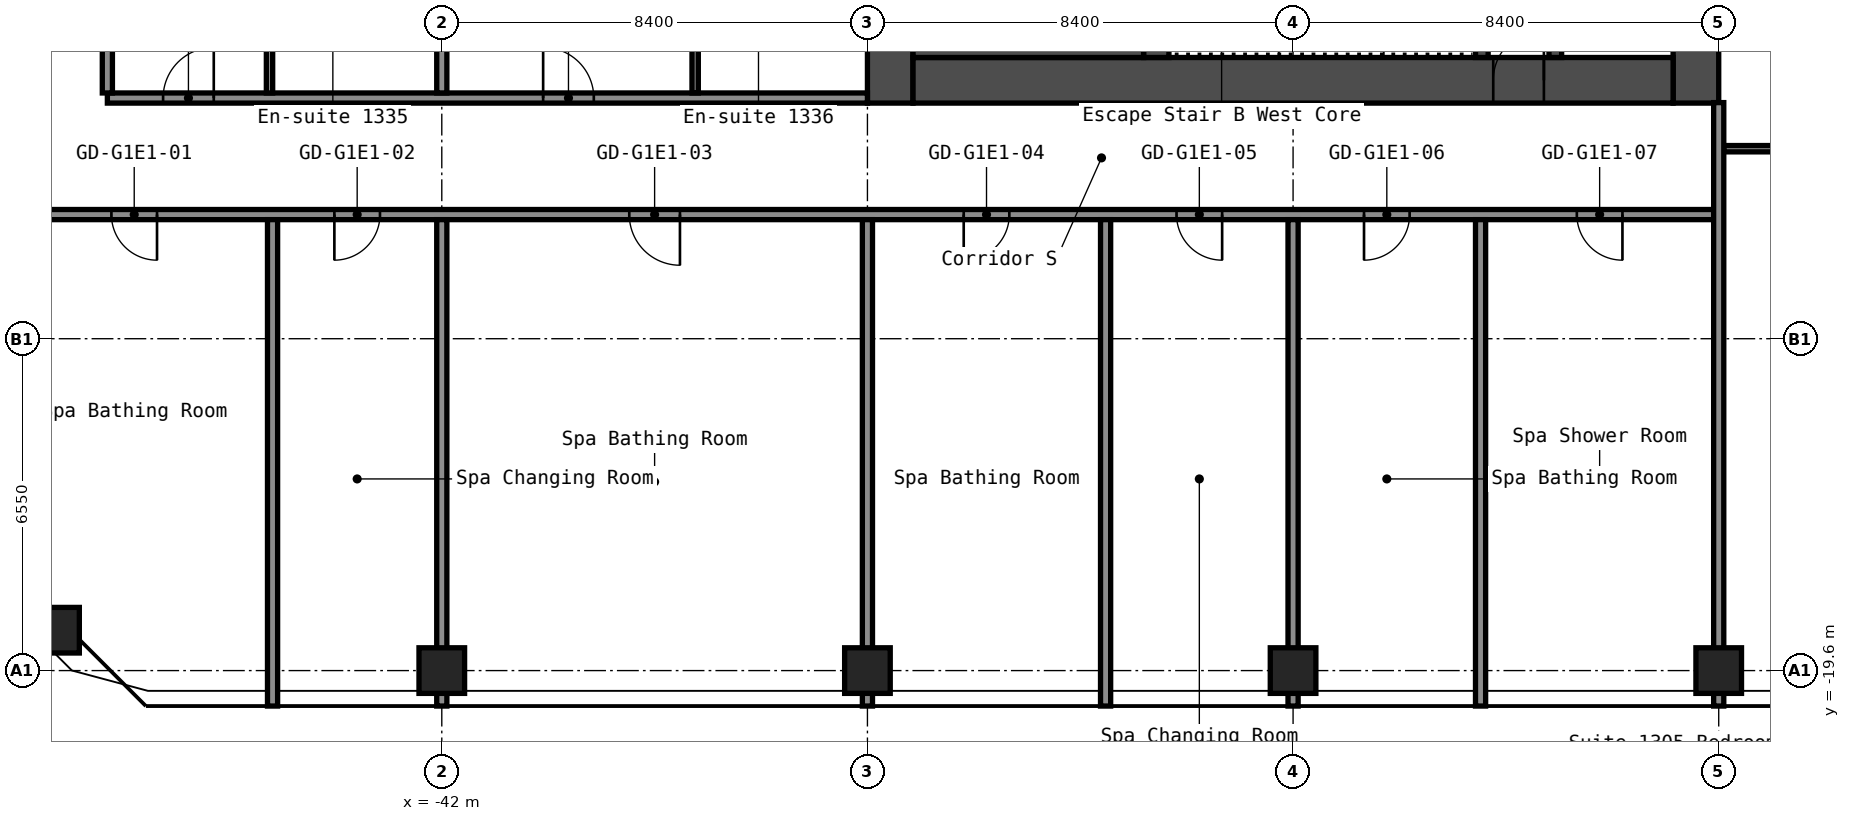
"""IFC4 building model, lengths in metres.
Left out: names, types, materials, properties, quantities, classifications, styles, units other than length and angle.
Written with IfcOpenShell. Run it as: python <this file> out.ifc"""

import sys

from ifc_helpers import new_model, si_unit, direction, frame, frame_2d, origin, origin_2d, place, context, subcontext, project, spatial, rectangle, hollow_rectangle, extrude, element, fill, save


model = new_model("IFC4")
c1 = context("Model", 3, precision=1e-05, world=origin(), true_north=direction((0.0, 1.0)))
c2 = subcontext(c1, "Body", "Model", "MODEL_VIEW")
j1 = project(units=[si_unit("LENGTHUNIT", "METRE"), si_unit("PLANEANGLEUNIT", "RADIAN")], contexts=[c1])
p1 = place(None, origin())
s1 = spatial("IfcSite", under=j1, at=p1, CompositionType="ELEMENT")
p2 = place(p1, origin())
s2 = spatial("IfcBuilding", under=s1, at=p2, CompositionType="ELEMENT")
p3 = place(p2, frame((0.0, 0.0, 48.6)))
s3 = spatial("IfcBuildingStorey", under=s2, at=p3, CompositionType="ELEMENT", Elevation=48.6)
for number, where, z_axis, x_axis in (
    (1, (-49.603, -18.803, 0.0), (0.0, 0.0, 1.0), (1.0, 0.0, 0.0)),
    (2, (-42.0, -19.6, 0.0), (0.0, 0.0, 1.0), (1.0, 0.0, 0.0)),
    (3, (-33.6, -19.6, 0.0), (0.0, 0.0, 1.0), (1.0, 0.0, 0.0)),
    (4, (-25.2, -19.6, 0.0), (0.0, 0.0, 1.0), (1.0, 0.0, 0.0)),
    (5, (-16.8, -19.6, 0.0), (0.0, 0.0, 1.0), (1.0, 0.0, 0.0)),
):
    element("IfcColumn", number, at=place(p3, frame(where, z_axis=z_axis, x_axis=x_axis)), inside=s3, PredefinedType="COLUMN", context=c2, shape_type="SweptSolid", body=[
        extrude(hollow_rectangle(XDim=0.9, YDim=0.9, WallThickness=0.036, at=origin_2d()), origin(), (0.0, 0.0, 1.0), 2.8),
    ])
p4 = place(p3, frame((-17.25, -8.4, 0.0), z_axis=(0.0, 0.0, 1.0), x_axis=(0.0, 1.0, 0.0)))
e6 = element("IfcWall", 6, at=p4, inside=s3, PredefinedType="SHEAR", context=c2, shape_type="SweptSolid", body=[
    extrude(rectangle(XDim=16.8, YDim=0.9, at=frame_2d((8.4, 0.0))), origin(), (0.0, 0.0, 1.0), 2.8),
])
p5 = place(p4, frame((12.75, 0.0, 0.0)))
e7 = element("IfcOpeningElement", 7, at=p5, cuts=e6, PredefinedType="OPENING", context=c2, shape_type="SweptSolid", body=[
    extrude(rectangle(XDim=1.2, YDim=2.1, at=frame_2d((0.6, 1.05))), frame((0.0, 0.46, 0.0), z_axis=(0.0, -1.0, 0.0), x_axis=(1.0, 0.0, 0.0)), (0.0, 0.0, 1.0), 0.92),
])
p6 = place(p4, frame((2.85, 0.0, 0.0)))
e8 = element("IfcOpeningElement", 8, at=p6, cuts=e6, PredefinedType="OPENING", context=c2, shape_type="SweptSolid", body=[
    extrude(rectangle(XDim=1.2, YDim=2.1, at=frame_2d((0.6, 1.05))), frame((0.0, 0.46, 0.0), z_axis=(0.0, -1.0, 0.0), x_axis=(1.0, 0.0, 0.0)), (0.0, 0.0, 1.0), 0.92),
])
p7 = place(p3, frame((-33.15, -8.4, 0.0), z_axis=(0.0, 0.0, 1.0), x_axis=(0.0, 1.0, 0.0)))
e9 = element("IfcWall", 9, at=p7, inside=s3, PredefinedType="SHEAR", context=c2, shape_type="SweptSolid", body=[
    extrude(rectangle(XDim=16.8, YDim=0.9, at=frame_2d((8.4, 0.0))), origin(), (0.0, 0.0, 1.0), 2.8),
])
p8 = place(p3, frame((-32.7, -7.95, 0.0), z_axis=(0.0, 0.0, 1.0), x_axis=(1.0, 0.0, 0.0)))
e10 = element("IfcWall", 10, at=p8, inside=s3, PredefinedType="SHEAR", context=c2, shape_type="SweptSolid", body=[
    extrude(rectangle(XDim=15.0, YDim=0.9, at=frame_2d((7.5, 0.0))), origin(), (0.0, 0.0, 1.0), 2.8),
])
p9 = place(p8, frame((11.45, 0.0, 0.0)))
e11 = element("IfcOpeningElement", 11, at=p9, cuts=e10, PredefinedType="OPENING", context=c2, shape_type="SweptSolid", body=[
    extrude(rectangle(XDim=1.0, YDim=2.1, at=frame_2d((0.5, 1.05))), frame((0.0, 0.46, 0.0), z_axis=(0.0, -1.0, 0.0), x_axis=(1.0, 0.0, 0.0)), (0.0, 0.0, 1.0), 0.92),
])
p10 = place(p3, frame((-20.025, -7.5, 0.0), z_axis=(0.0, 0.0, 1.0), x_axis=(0.0, 1.0, 0.0)))
e12 = element("IfcWall", 12, at=p10, inside=s3, PredefinedType="SHEAR", context=c2, shape_type="SweptSolid", body=[
    extrude(rectangle(XDim=6.3, YDim=0.25, at=frame_2d((3.15, 0.0))), origin(), (0.0, 0.0, 1.0), 2.8),
])
p11 = place(p10, frame((2.4, 0.0, 0.0)))
e13 = element("IfcOpeningElement", 13, at=p11, cuts=e12, PredefinedType="OPENING", context=c2, shape_type="SweptSolid", body=[
    extrude(rectangle(XDim=1.0, YDim=2.1, at=frame_2d((0.5, 1.05))), frame((0.0, 0.135, 0.0), z_axis=(0.0, -1.0, 0.0), x_axis=(1.0, 0.0, 0.0)), (0.0, 0.0, 1.0), 0.27),
])
p12 = place(p3, frame((-21.475, -7.5, 0.0), z_axis=(0.0, 0.0, 1.0), x_axis=(0.0, 1.0, 0.0)))
e14 = element("IfcWall", 14, at=p12, inside=s3, PredefinedType="SHEAR", context=c2, shape_type="SweptSolid", body=[
    extrude(rectangle(XDim=3.75, YDim=0.25, at=frame_2d((1.875, 0.0))), origin(), (0.0, 0.0, 1.0), 2.8),
])
p13 = place(p12, frame((1.3, 0.0, 0.0)))
e15 = element("IfcOpeningElement", 15, at=p13, cuts=e14, PredefinedType="OPENING", context=c2, shape_type="SweptSolid", body=[
    extrude(rectangle(XDim=1.2, YDim=2.1, at=frame_2d((0.6, 1.05))), frame((0.0, 0.135, 0.0), z_axis=(0.0, -1.0, 0.0), x_axis=(1.0, 0.0, 0.0)), (0.0, 0.0, 1.0), 0.27),
])
p14 = place(p3, frame((-27.9, -7.5, 0.0), z_axis=(0.0, 0.0, 1.0), x_axis=(0.0, 1.0, 0.0)))
e16 = element("IfcWall", 16, at=p14, inside=s3, PredefinedType="SHEAR", context=c2, shape_type="SweptSolid", body=[
    extrude(rectangle(XDim=3.75, YDim=0.5, at=frame_2d((1.875, 0.0))), origin(), (0.0, 0.0, 1.0), 2.8),
])
p15 = place(p3, frame((-32.7, -6.75, 0.0), z_axis=(0.0, 0.0, 1.0), x_axis=(1.0, 0.0, 0.0)))
e17 = element("IfcWall", 17, at=p15, inside=s3, PredefinedType="SHEAR", context=c2, shape_type="SweptSolid", body=[
    extrude(rectangle(XDim=4.55, YDim=1.5, at=frame_2d((2.275, 0.0))), origin(), (0.0, 0.0, 1.0), 2.8),
])
p16 = place(p3, frame((-51.1, -10.6, 0.0), z_axis=(0.0, 0.0, 1.0), x_axis=(1.0, 0.0, 0.0)))
e18 = element("IfcWall", 18, at=p16, inside=s3, PredefinedType="PARTITIONING", context=c2, shape_type="SweptSolid", body=[
    extrude(rectangle(XDim=34.3, YDim=0.2, at=frame_2d((17.15, 0.0))), origin(), (0.0, 0.0, 1.0), 2.8),
])
p17 = place(p16, frame((2.58, 0.0, 0.0)))
e19 = element("IfcOpeningElement", 19, at=p17, cuts=e18, PredefinedType="OPENING", context=c2, shape_type="SweptSolid", body=[
    extrude(rectangle(XDim=0.9, YDim=2.1, at=frame_2d((0.45, 1.05))), frame((0.0, 0.11, 0.0), z_axis=(0.0, -1.0, 0.0), x_axis=(1.0, 0.0, 0.0)), (0.0, 0.0, 1.0), 0.22),
])
p18 = place(p16, frame((6.98, 0.0, 0.0)))
e20 = element("IfcOpeningElement", 20, at=p18, cuts=e18, PredefinedType="OPENING", context=c2, shape_type="SweptSolid", body=[
    extrude(rectangle(XDim=0.9, YDim=2.1, at=frame_2d((0.45, 1.05))), frame((0.0, 0.11, 0.0), z_axis=(0.0, -1.0, 0.0), x_axis=(1.0, 0.0, 0.0)), (0.0, 0.0, 1.0), 0.22),
])
p19 = place(p16, frame((12.8, 0.0, 0.0)))
e21 = element("IfcOpeningElement", 21, at=p19, cuts=e18, PredefinedType="OPENING", context=c2, shape_type="SweptSolid", body=[
    extrude(rectangle(XDim=1.0, YDim=2.1, at=frame_2d((0.5, 1.05))), frame((0.0, 0.11, 0.0), z_axis=(0.0, -1.0, 0.0), x_axis=(1.0, 0.0, 0.0)), (0.0, 0.0, 1.0), 0.22),
])
p20 = place(p16, frame((19.4, 0.0, 0.0)))
e22 = element("IfcOpeningElement", 22, at=p20, cuts=e18, PredefinedType="OPENING", context=c2, shape_type="SweptSolid", body=[
    extrude(rectangle(XDim=0.9, YDim=2.1, at=frame_2d((0.45, 1.05))), frame((0.0, 0.11, 0.0), z_axis=(0.0, -1.0, 0.0), x_axis=(1.0, 0.0, 0.0)), (0.0, 0.0, 1.0), 0.22),
])
p21 = place(p16, frame((23.6, 0.0, 0.0)))
e23 = element("IfcOpeningElement", 23, at=p21, cuts=e18, PredefinedType="OPENING", context=c2, shape_type="SweptSolid", body=[
    extrude(rectangle(XDim=0.9, YDim=2.1, at=frame_2d((0.45, 1.05))), frame((0.0, 0.11, 0.0), z_axis=(0.0, -1.0, 0.0), x_axis=(1.0, 0.0, 0.0)), (0.0, 0.0, 1.0), 0.22),
])
p22 = place(p16, frame((27.3, 0.0, 0.0)))
e24 = element("IfcOpeningElement", 24, at=p22, cuts=e18, PredefinedType="OPENING", context=c2, shape_type="SweptSolid", body=[
    extrude(rectangle(XDim=0.9, YDim=2.1, at=frame_2d((0.45, 1.05))), frame((0.0, 0.11, 0.0), z_axis=(0.0, -1.0, 0.0), x_axis=(1.0, 0.0, 0.0)), (0.0, 0.0, 1.0), 0.22),
])
p23 = place(p16, frame((31.5, 0.0, 0.0)))
e25 = element("IfcOpeningElement", 25, at=p23, cuts=e18, PredefinedType="OPENING", context=c2, shape_type="SweptSolid", body=[
    extrude(rectangle(XDim=0.9, YDim=2.1, at=frame_2d((0.45, 1.05))), frame((0.0, 0.11, 0.0), z_axis=(0.0, -1.0, 0.0), x_axis=(1.0, 0.0, 0.0)), (0.0, 0.0, 1.0), 0.22),
])
p24 = place(p3, frame((-16.7, -9.3, 0.0), z_axis=(0.0, 0.0, 1.0), x_axis=(1.0, 0.0, 0.0)))
e26 = element("IfcWall", 26, at=p24, inside=s3, PredefinedType="PARTITIONING", context=c2, shape_type="SweptSolid", body=[
    extrude(rectangle(XDim=2.837, YDim=0.125, at=frame_2d((1.419, 0.0))), origin(), (0.0, 0.0, 1.0), 2.8),
])
p25 = place(p24, frame((1.0, 0.0, 0.0)))
e27 = element("IfcOpeningElement", 27, at=p25, cuts=e26, PredefinedType="OPENING", context=c2, shape_type="SweptSolid", body=[
    extrude(rectangle(XDim=0.8, YDim=2.1, at=frame_2d((0.4, 1.05))), frame((0.0, 0.073, 0.0), z_axis=(0.0, -1.0, 0.0), x_axis=(1.0, 0.0, 0.0)), (0.0, 0.0, 1.0), 0.145),
])
p26 = place(p3, frame((-48.6, -8.3, 0.0), z_axis=(0.0, 0.0, 1.0), x_axis=(1.0, 0.0, 0.0)))
e28 = element("IfcWall", 28, at=p26, inside=s3, PredefinedType="PARTITIONING", context=c2, shape_type="SweptSolid", body=[
    extrude(rectangle(XDim=15.0, YDim=0.2, at=frame_2d((7.5, 0.0))), origin(), (0.0, 0.0, 1.0), 2.8),
])
p27 = place(p26, frame((1.1, 0.0, 0.0)))
e29 = element("IfcOpeningElement", 29, at=p27, cuts=e28, PredefinedType="OPENING", context=c2, shape_type="SweptSolid", body=[
    extrude(rectangle(XDim=1.0, YDim=2.1, at=frame_2d((0.5, 1.05))), frame((0.0, 0.11, 0.0), z_axis=(0.0, -1.0, 0.0), x_axis=(1.0, 0.0, 0.0)), (0.0, 0.0, 1.0), 0.22),
])
p28 = place(p26, frame((8.6, 0.0, 0.0)))
e30 = element("IfcOpeningElement", 30, at=p28, cuts=e28, PredefinedType="OPENING", context=c2, shape_type="SweptSolid", body=[
    extrude(rectangle(XDim=1.0, YDim=2.1, at=frame_2d((0.5, 1.05))), frame((0.0, 0.11, 0.0), z_axis=(0.0, -1.0, 0.0), x_axis=(1.0, 0.0, 0.0)), (0.0, 0.0, 1.0), 0.22),
])
p29 = place(p3, frame((-48.6, -8.2, 0.0), z_axis=(0.0, 0.0, 1.0), x_axis=(0.0, 1.0, 0.0)))
e31 = element("IfcWall", 31, at=p29, inside=s3, PredefinedType="PARTITIONING", context=c2, shape_type="SweptSolid", body=[
    extrude(rectangle(XDim=16.4, YDim=0.2, at=frame_2d((8.2, 0.0))), origin(), (0.0, 0.0, 1.0), 2.8),
])
p30 = place(p3, frame((-45.4, -8.2, 0.0), z_axis=(0.0, 0.0, 1.0), x_axis=(0.0, 1.0, 0.0)))
e32 = element("IfcWall", 32, at=p30, inside=s3, PredefinedType="PARTITIONING", context=c2, shape_type="SweptSolid", body=[
    extrude(rectangle(XDim=3.3, YDim=0.125, at=frame_2d((1.65, 0.0))), origin(), (0.0, 0.0, 1.0), 2.8),
])
for number, where, z_axis, x_axis in (
    (33, (-45.34, -20.3, 0.0), (0.0, 0.0, 1.0), (0.0, 1.0, 0.0)),
    (34, (-42.0, -20.3, 0.0), (0.0, 0.0, 1.0), (0.0, 1.0, 0.0)),
):
    element("IfcWall", number, at=place(p3, frame(where, z_axis=z_axis, x_axis=x_axis)), inside=s3, PredefinedType="PARTITIONING", context=c2, shape_type="SweptSolid", body=[
        extrude(rectangle(XDim=9.6, YDim=0.2, at=frame_2d((4.8, 0.0))), origin(), (0.0, 0.0, 1.0), 2.8),
    ])
p31 = place(p3, frame((-42.0, -8.2, 0.0), z_axis=(0.0, 0.0, 1.0), x_axis=(0.0, 1.0, 0.0)))
e35 = element("IfcWall", 35, at=p31, inside=s3, PredefinedType="PARTITIONING", context=c2, shape_type="SweptSolid", body=[
    extrude(rectangle(XDim=16.4, YDim=0.2, at=frame_2d((8.2, 0.0))), origin(), (0.0, 0.0, 1.0), 2.8),
])
p32 = place(p3, frame((-37.0, -8.2, 0.0), z_axis=(0.0, 0.0, 1.0), x_axis=(0.0, 1.0, 0.0)))
e36 = element("IfcWall", 36, at=p32, inside=s3, PredefinedType="PARTITIONING", context=c2, shape_type="SweptSolid", body=[
    extrude(rectangle(XDim=3.3, YDim=0.125, at=frame_2d((1.65, 0.0))), origin(), (0.0, 0.0, 1.0), 2.8),
])
for number, where, z_axis, x_axis in (
    (37, (-33.6, -20.3, 0.0), (0.0, 0.0, 1.0), (0.0, 1.0, 0.0)),
    (38, (-28.9, -20.3, 0.0), (0.0, 0.0, 1.0), (0.0, 1.0, 0.0)),
    (39, (-25.2, -20.3, 0.0), (0.0, 0.0, 1.0), (0.0, 1.0, 0.0)),
    (40, (-21.5, -20.3, 0.0), (0.0, 0.0, 1.0), (0.0, 1.0, 0.0)),
):
    element("IfcWall", number, at=place(p3, frame(where, z_axis=z_axis, x_axis=x_axis)), inside=s3, PredefinedType="PARTITIONING", context=c2, shape_type="SweptSolid", body=[
        extrude(rectangle(XDim=9.6, YDim=0.2, at=frame_2d((4.8, 0.0))), origin(), (0.0, 0.0, 1.0), 2.8),
    ])
p33 = place(p3, frame((-16.8, -20.3, 0.0), z_axis=(0.0, 0.0, 1.0), x_axis=(0.0, 1.0, 0.0)))
e41 = element("IfcWall", 41, at=p33, inside=s3, PredefinedType="PARTITIONING", context=c2, shape_type="SweptSolid", body=[
    extrude(rectangle(XDim=11.91, YDim=0.2, at=frame_2d((5.955, 0.0))), origin(), (0.0, 0.0, 1.0), 2.8),
])
p34 = place(p9, origin())
e42 = element("IfcDoor", 42, at=p34, inside=s3, OperationType="SINGLE_SWING_LEFT", PredefinedType="DOOR", context=c2, shape_type="SweptSolid", body=[
    extrude(rectangle(XDim=1.0, YDim=2.1, at=frame_2d((0.5, 1.05))), frame((0.0, 0.025, 0.0), z_axis=(0.0, -1.0, 0.0), x_axis=(1.0, 0.0, 0.0)), (0.0, 0.0, 1.0), 0.05),
])
fill(e11, e42)
p35 = place(p17, origin())
e43 = element("IfcDoor", 43, at=p35, inside=s3, OperationType="SINGLE_SWING_RIGHT", PredefinedType="DOOR", context=c2, shape_type="SweptSolid", body=[
    extrude(rectangle(XDim=0.9, YDim=2.1, at=frame_2d((0.45, 1.05))), frame((0.0, 0.025, 0.0), z_axis=(0.0, -1.0, 0.0), x_axis=(1.0, 0.0, 0.0)), (0.0, 0.0, 1.0), 0.05),
])
fill(e19, e43)
p36 = place(p18, origin())
e44 = element("IfcDoor", 44, at=p36, inside=s3, OperationType="SINGLE_SWING_LEFT", PredefinedType="DOOR", context=c2, shape_type="SweptSolid", body=[
    extrude(rectangle(XDim=0.9, YDim=2.1, at=frame_2d((0.45, 1.05))), frame((0.0, 0.025, 0.0), z_axis=(0.0, -1.0, 0.0), x_axis=(1.0, 0.0, 0.0)), (0.0, 0.0, 1.0), 0.05),
])
fill(e20, e44)
p37 = place(p19, origin())
e45 = element("IfcDoor", 45, at=p37, inside=s3, OperationType="SINGLE_SWING_RIGHT", PredefinedType="DOOR", context=c2, shape_type="SweptSolid", body=[
    extrude(rectangle(XDim=1.0, YDim=2.1, at=frame_2d((0.5, 1.05))), frame((0.0, 0.025, 0.0), z_axis=(0.0, -1.0, 0.0), x_axis=(1.0, 0.0, 0.0)), (0.0, 0.0, 1.0), 0.05),
])
fill(e21, e45)
p38 = place(p20, origin())
e46 = element("IfcDoor", 46, at=p38, inside=s3, OperationType="SINGLE_SWING_LEFT", PredefinedType="DOOR", context=c2, shape_type="SweptSolid", body=[
    extrude(rectangle(XDim=0.9, YDim=2.1, at=frame_2d((0.45, 1.05))), frame((0.0, 0.025, 0.0), z_axis=(0.0, -1.0, 0.0), x_axis=(1.0, 0.0, 0.0)), (0.0, 0.0, 1.0), 0.05),
])
fill(e22, e46)
p39 = place(p21, origin())
e47 = element("IfcDoor", 47, at=p39, inside=s3, OperationType="SINGLE_SWING_RIGHT", PredefinedType="DOOR", context=c2, shape_type="SweptSolid", body=[
    extrude(rectangle(XDim=0.9, YDim=2.1, at=frame_2d((0.45, 1.05))), frame((0.0, 0.025, 0.0), z_axis=(0.0, -1.0, 0.0), x_axis=(1.0, 0.0, 0.0)), (0.0, 0.0, 1.0), 0.05),
])
fill(e23, e47)
p40 = place(p22, origin())
e48 = element("IfcDoor", 48, at=p40, inside=s3, OperationType="SINGLE_SWING_LEFT", PredefinedType="DOOR", context=c2, shape_type="SweptSolid", body=[
    extrude(rectangle(XDim=0.9, YDim=2.1, at=frame_2d((0.45, 1.05))), frame((0.0, 0.025, 0.0), z_axis=(0.0, -1.0, 0.0), x_axis=(1.0, 0.0, 0.0)), (0.0, 0.0, 1.0), 0.05),
])
fill(e24, e48)
p41 = place(p23, origin())
e49 = element("IfcDoor", 49, at=p41, inside=s3, OperationType="SINGLE_SWING_RIGHT", PredefinedType="DOOR", context=c2, shape_type="SweptSolid", body=[
    extrude(rectangle(XDim=0.9, YDim=2.1, at=frame_2d((0.45, 1.05))), frame((0.0, 0.025, 0.0), z_axis=(0.0, -1.0, 0.0), x_axis=(1.0, 0.0, 0.0)), (0.0, 0.0, 1.0), 0.05),
])
fill(e25, e49)
p42 = place(p27, origin())
e50 = element("IfcDoor", 50, at=p42, inside=s3, OperationType="SINGLE_SWING_LEFT", PredefinedType="DOOR", context=c2, shape_type="SweptSolid", body=[
    extrude(rectangle(XDim=1.0, YDim=2.1, at=frame_2d((0.5, 1.05))), frame((0.0, 0.025, 0.0), z_axis=(0.0, -1.0, 0.0), x_axis=(1.0, 0.0, 0.0)), (0.0, 0.0, 1.0), 0.05),
])
fill(e29, e50)
p43 = place(p28, origin())
e51 = element("IfcDoor", 51, at=p43, inside=s3, OperationType="SINGLE_SWING_RIGHT", PredefinedType="DOOR", context=c2, shape_type="SweptSolid", body=[
    extrude(rectangle(XDim=1.0, YDim=2.1, at=frame_2d((0.5, 1.05))), frame((0.0, 0.025, 0.0), z_axis=(0.0, -1.0, 0.0), x_axis=(1.0, 0.0, 0.0)), (0.0, 0.0, 1.0), 0.05),
])
fill(e30, e51)
save(model, sys.argv[1])
